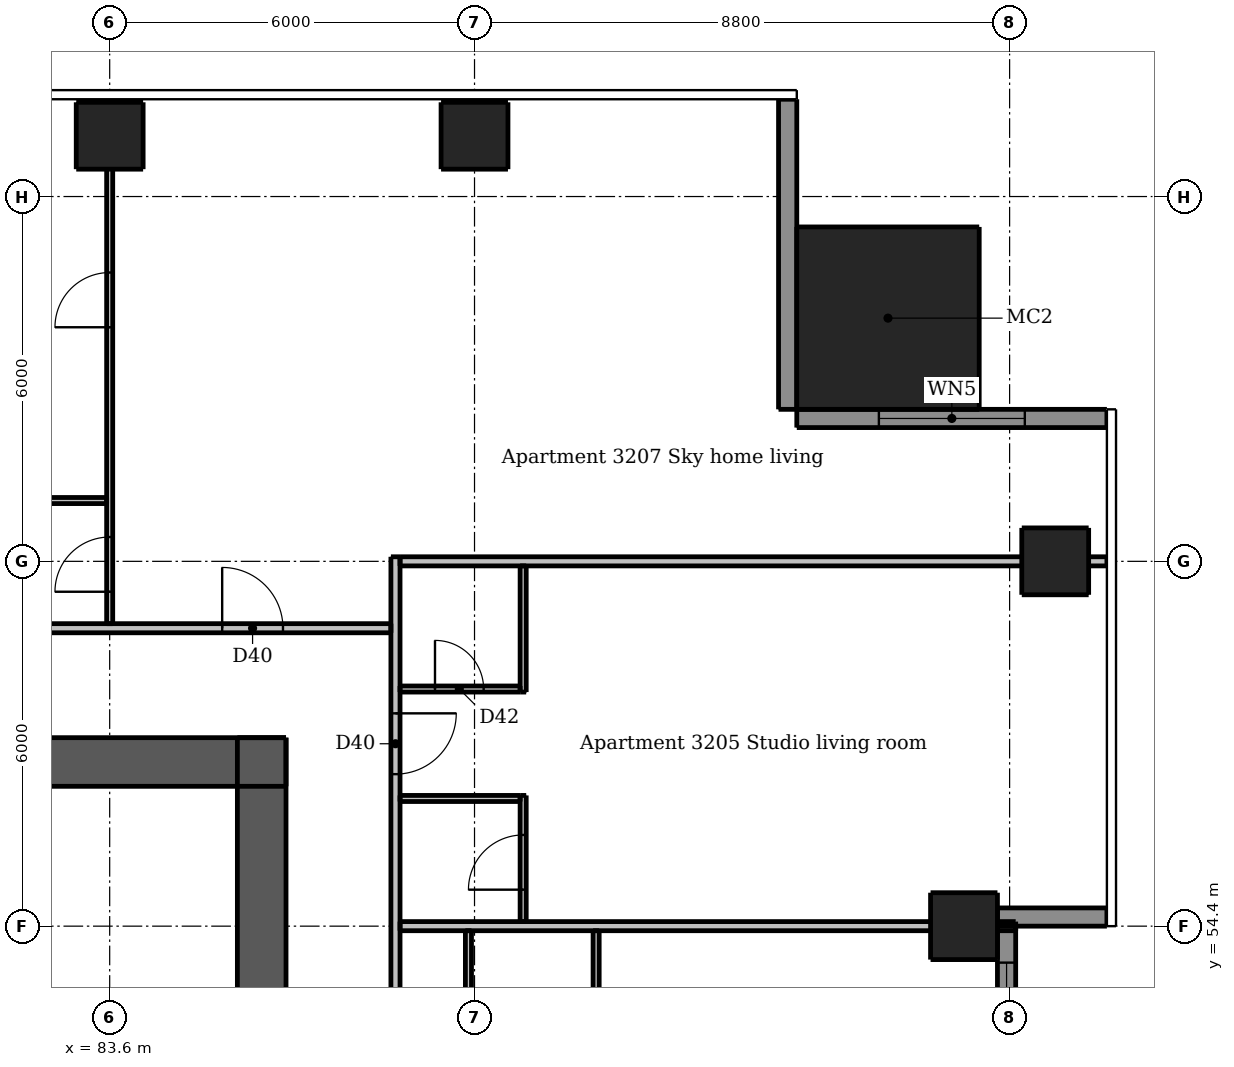
"""IFC4 building model, lengths in metres.
Left out: names, types, materials, properties, quantities, classifications, styles, units other than length and angle.
Written with IfcOpenShell. Run it as: python <this file> out.ifc"""

import sys

from ifc_helpers import new_model, si_unit, direction, frame, frame_2d, origin, origin_2d, place, context, subcontext, project, spatial, rectangle, extrude, element, fill, save


model = new_model("IFC4")
c1 = context("Model", 3, precision=1e-05, world=origin(), true_north=direction((0.0, 1.0)))
c2 = subcontext(c1, "Body", "Model", "MODEL_VIEW")
j1 = project(units=[si_unit("LENGTHUNIT", "METRE"), si_unit("PLANEANGLEUNIT", "RADIAN")], contexts=[c1])
p1 = place(None, origin())
s1 = spatial("IfcSite", under=j1, at=p1, CompositionType="ELEMENT")
p2 = place(p1, origin())
s2 = spatial("IfcBuilding", under=s1, at=p2, CompositionType="ELEMENT")
p3 = place(p2, frame((0.0, 0.0, 118.3)))
s3 = spatial("IfcBuildingStorey", under=s2, at=p3, CompositionType="ELEMENT", Elevation=118.3)
p4 = place(p3, frame((62.5, 57.1, 0.0), z_axis=(0.0, 0.0, 1.0), x_axis=(1.0, 0.0, 0.0)))
e1 = element("IfcWall", 1, at=p4, inside=s3, PredefinedType="SHEAR", context=c2, shape_type="SweptSolid", body=[
    extrude(rectangle(XDim=24.0, YDim=0.8, at=frame_2d((12.0, 0.0))), origin(), (0.0, 0.0, 1.0), 3.05),
])
p5 = place(p4, frame((20.9, 0.0, 0.0)))
e2 = element("IfcOpeningElement", 2, at=p5, cuts=e1, PredefinedType="OPENING", context=c2, shape_type="SweptSolid", body=[
    extrude(rectangle(XDim=1.1, YDim=2.1, at=frame_2d((0.55, 1.05))), frame((0.0, 0.41, 0.0), z_axis=(0.0, -1.0, 0.0), x_axis=(1.0, 0.0, 0.0)), (0.0, 0.0, 1.0), 0.82),
])
p6 = place(p4, frame((2.0, 0.0, 0.0)))
e3 = element("IfcOpeningElement", 3, at=p6, cuts=e1, PredefinedType="OPENING", context=c2, shape_type="SweptSolid", body=[
    extrude(rectangle(XDim=1.1, YDim=2.1, at=frame_2d((0.55, 1.05))), frame((0.0, 0.41, 0.0), z_axis=(0.0, -1.0, 0.0), x_axis=(1.0, 0.0, 0.0)), (0.0, 0.0, 1.0), 0.82),
])
p7 = place(p4, frame((6.075, 0.0, 0.0)))
e4 = element("IfcOpeningElement", 4, at=p7, cuts=e1, PredefinedType="OPENING", context=c2, shape_type="SweptSolid", body=[
    extrude(rectangle(XDim=0.9, YDim=2.1, at=frame_2d((0.45, 1.05))), frame((0.0, 0.41, 0.0), z_axis=(0.0, -1.0, 0.0), x_axis=(1.0, 0.0, 0.0)), (0.0, 0.0, 1.0), 0.82),
])
p8 = place(p4, frame((10.455, 0.0, 0.0)))
e5 = element("IfcOpeningElement", 5, at=p8, cuts=e1, PredefinedType="OPENING", context=c2, shape_type="SweptSolid", body=[
    extrude(rectangle(XDim=0.9, YDim=2.1, at=frame_2d((0.45, 1.05))), frame((0.0, 0.41, 0.0), z_axis=(0.0, -1.0, 0.0), x_axis=(1.0, 0.0, 0.0)), (0.0, 0.0, 1.0), 0.82),
])
p9 = place(p4, frame((15.93, 0.0, 0.0)))
e6 = element("IfcOpeningElement", 6, at=p9, cuts=e1, PredefinedType="OPENING", context=c2, shape_type="SweptSolid", body=[
    extrude(rectangle(XDim=0.9, YDim=2.1, at=frame_2d((0.45, 1.05))), frame((0.0, 0.41, 0.0), z_axis=(0.0, -1.0, 0.0), x_axis=(1.0, 0.0, 0.0)), (0.0, 0.0, 1.0), 0.82),
])
p10 = place(p3, frame((86.1, 33.5, 0.0), z_axis=(0.0, 0.0, 1.0), x_axis=(0.0, 1.0, 0.0)))
e7 = element("IfcWall", 7, at=p10, inside=s3, PredefinedType="SHEAR", context=c2, shape_type="SweptSolid", body=[
    extrude(rectangle(XDim=24.0, YDim=0.8, at=frame_2d((12.0, 0.0))), origin(), (0.0, 0.0, 1.0), 3.05),
])
p11 = place(p10, frame((11.2, 0.0, 0.0)))
e8 = element("IfcOpeningElement", 8, at=p11, cuts=e7, PredefinedType="OPENING", context=c2, shape_type="SweptSolid", body=[
    extrude(rectangle(XDim=1.6, YDim=2.1, at=frame_2d((0.8, 1.05))), frame((0.0, 0.41, 0.0), z_axis=(0.0, -1.0, 0.0), x_axis=(1.0, 0.0, 0.0)), (0.0, 0.0, 1.0), 0.82),
])
for number, where, z_axis, x_axis in (
    (9, (97.65, 54.4, 0.0), (0.0, 0.0, 1.0), (1.0, 0.0, 0.0)),
    (10, (99.15, 60.4, 0.0), (0.0, 0.0, 1.0), (1.0, 0.0, 0.0)),
    (11, (83.6, 67.4, 0.0), (0.0, 0.0, 1.0), (1.0, 0.0, 0.0)),
    (12, (89.6, 67.4, 0.0), (0.0, 0.0, 1.0), (1.0, 0.0, 0.0)),
):
    element("IfcColumn", number, at=place(p3, frame(where, z_axis=z_axis, x_axis=x_axis)), inside=s3, PredefinedType="COLUMN", context=c2, shape_type="SweptSolid", body=[
        extrude(rectangle(XDim=1.1, YDim=1.1, at=origin_2d()), origin(), (0.0, 0.0, 1.0), 3.05),
    ])
p12 = place(p3, frame((96.4, 64.4, 0.0), z_axis=(0.0, 0.0, 1.0), x_axis=(1.0, 0.0, 0.0)))
e13 = element("IfcColumn", 13, at=p12, inside=s3, PredefinedType="COLUMN", context=c2, shape_type="SweptSolid", body=[
    extrude(rectangle(XDim=3.0, YDim=3.0, at=origin_2d()), origin(), (0.0, 0.0, 1.0), 3.3),
])
p13 = place(p3, frame((98.2, 54.55, 0.0), z_axis=(0.0, 0.0, 1.0), x_axis=(1.0, 0.0, 0.0)))
e14 = element("IfcWall", 14, at=p13, inside=s3, PredefinedType="SOLIDWALL", context=c2, shape_type="SweptSolid", body=[
    extrude(rectangle(XDim=1.8, YDim=0.3, at=frame_2d((0.9, 0.0))), origin(), (0.0, 0.0, 1.0), 3.05),
])
p14 = place(p3, frame((100.0, 62.75, 0.0), z_axis=(0.0, 0.0, 1.0), x_axis=(-1.0, 0.0, 0.0)))
e15 = element("IfcWall", 15, at=p14, inside=s3, PredefinedType="SOLIDWALL", context=c2, shape_type="SweptSolid", body=[
    extrude(rectangle(XDim=5.1, YDim=0.3, at=frame_2d((2.55, 0.0))), origin(), (0.0, 0.0, 1.0), 3.05),
])
p15 = place(p14, frame((1.35, 0.0, 0.15)))
e16 = element("IfcOpeningElement", 16, at=p15, cuts=e15, PredefinedType="OPENING", context=c2, shape_type="SweptSolid", body=[
    extrude(rectangle(XDim=2.4, YDim=2.1, at=frame_2d((1.2, 1.05))), frame((0.0, 0.16, 0.0), z_axis=(0.0, -1.0, 0.0), x_axis=(1.0, 0.0, 0.0)), (0.0, 0.0, 1.0), 0.32),
])
p16 = place(p3, frame((94.75, 62.9, 0.0), z_axis=(0.0, 0.0, 1.0), x_axis=(0.0, 1.0, 0.0)))
e17 = element("IfcWall", 17, at=p16, inside=s3, PredefinedType="SOLIDWALL", context=c2, shape_type="SweptSolid", body=[
    extrude(rectangle(XDim=5.1, YDim=0.3, at=frame_2d((2.55, 0.0))), origin(), (0.0, 0.0, 1.0), 3.05),
])
p17 = place(p3, frame((98.35, 48.4, 0.0), z_axis=(0.0, 0.0, 1.0), x_axis=(0.0, 1.0, 0.0)))
e18 = element("IfcWall", 18, at=p17, inside=s3, PredefinedType="SOLIDWALL", context=c2, shape_type="SweptSolid", body=[
    extrude(rectangle(XDim=6.0, YDim=0.3, at=frame_2d((3.0, 0.0))), origin(), (0.0, 0.0, 1.0), 3.05),
])
p18 = place(p17, frame((0.6, 0.0, 0.15)))
e19 = element("IfcOpeningElement", 19, at=p18, cuts=e18, PredefinedType="OPENING", context=c2, shape_type="SweptSolid", body=[
    extrude(rectangle(XDim=1.8, YDim=2.1, at=frame_2d((0.9, 1.05))), frame((0.0, 0.16, 0.0), z_axis=(0.0, -1.0, 0.0), x_axis=(1.0, 0.0, 0.0)), (0.0, 0.0, 1.0), 0.32),
])
p19 = place(p17, frame((3.6, 0.0, 0.15)))
e20 = element("IfcOpeningElement", 20, at=p19, cuts=e18, PredefinedType="OPENING", context=c2, shape_type="SweptSolid", body=[
    extrude(rectangle(XDim=1.8, YDim=2.1, at=frame_2d((0.9, 1.05))), frame((0.0, 0.16, 0.0), z_axis=(0.0, -1.0, 0.0), x_axis=(1.0, 0.0, 0.0)), (0.0, 0.0, 1.0), 0.32),
])
p20 = place(p3, frame((83.6, 59.375, 0.0), z_axis=(0.0, 0.0, 1.0), x_axis=(0.0, 1.0, 0.0)))
e21 = element("IfcWall", 21, at=p20, inside=s3, PredefinedType="PARTITIONING", context=c2, shape_type="SweptSolid", body=[
    extrude(rectangle(XDim=8.625, YDim=0.1, at=frame_2d((4.312, 0.0))), origin(), (0.0, 0.0, 1.0), 2.516),
])
p21 = place(p20, frame((0.525, 0.0, 0.0)))
e22 = element("IfcOpeningElement", 22, at=p21, cuts=e21, PredefinedType="OPENING", context=c2, shape_type="SweptSolid", body=[
    extrude(rectangle(XDim=0.9, YDim=2.1, at=frame_2d((0.45, 1.05))), frame((0.0, 0.06, 0.0), z_axis=(0.0, -1.0, 0.0), x_axis=(1.0, 0.0, 0.0)), (0.0, 0.0, 1.0), 0.12),
])
p22 = place(p20, frame((4.875, 0.0, 0.0)))
e23 = element("IfcOpeningElement", 23, at=p22, cuts=e21, PredefinedType="OPENING", context=c2, shape_type="SweptSolid", body=[
    extrude(rectangle(XDim=0.9, YDim=2.1, at=frame_2d((0.45, 1.05))), frame((0.0, 0.06, 0.0), z_axis=(0.0, -1.0, 0.0), x_axis=(1.0, 0.0, 0.0)), (0.0, 0.0, 1.0), 0.12),
])
p23 = place(p3, frame((89.5, 54.325, 0.0), z_axis=(0.0, 0.0, 1.0), x_axis=(0.0, -1.0, 0.0)))
e24 = element("IfcWall", 24, at=p23, inside=s3, PredefinedType="PARTITIONING", context=c2, shape_type="SweptSolid", body=[
    extrude(rectangle(XDim=14.85, YDim=0.1, at=frame_2d((7.425, 0.0))), origin(), (0.0, 0.0, 1.0), 3.05),
])
p24 = place(p23, frame((5.775, 0.0, 0.0)))
e25 = element("IfcOpeningElement", 25, at=p24, cuts=e24, PredefinedType="OPENING", context=c2, shape_type="SweptSolid", body=[
    extrude(rectangle(XDim=0.9, YDim=2.1, at=frame_2d((0.45, 1.05))), frame((0.0, 0.06, 0.0), z_axis=(0.0, -1.0, 0.0), x_axis=(1.0, 0.0, 0.0)), (0.0, 0.0, 1.0), 0.12),
])
p25 = place(p23, frame((0.975, 0.0, 0.0)))
e26 = element("IfcOpeningElement", 26, at=p25, cuts=e24, PredefinedType="OPENING", context=c2, shape_type="SweptSolid", body=[
    extrude(rectangle(XDim=0.9, YDim=2.1, at=frame_2d((0.45, 1.05))), frame((0.0, 0.06, 0.0), z_axis=(0.0, -1.0, 0.0), x_axis=(1.0, 0.0, 0.0)), (0.0, 0.0, 1.0), 0.12),
])
p26 = place(p23, frame((12.975, 0.0, 0.0)))
e27 = element("IfcOpeningElement", 27, at=p26, cuts=e24, PredefinedType="OPENING", context=c2, shape_type="SweptSolid", body=[
    extrude(rectangle(XDim=0.9, YDim=2.1, at=frame_2d((0.45, 1.05))), frame((0.0, 0.06, 0.0), z_axis=(0.0, -1.0, 0.0), x_axis=(1.0, 0.0, 0.0)), (0.0, 0.0, 1.0), 0.12),
])
p27 = place(p23, frame((10.325, 0.0, 0.0)))
e28 = element("IfcOpeningElement", 28, at=p27, cuts=e24, PredefinedType="OPENING", context=c2, shape_type="SweptSolid", body=[
    extrude(rectangle(XDim=0.8, YDim=2.1, at=frame_2d((0.4, 1.05))), frame((0.0, 0.06, 0.0), z_axis=(0.0, -1.0, 0.0), x_axis=(1.0, 0.0, 0.0)), (0.0, 0.0, 1.0), 0.12),
])
p28 = place(p3, frame((90.4, 54.475, 0.0), z_axis=(0.0, 0.0, 1.0), x_axis=(0.0, 1.0, 0.0)))
e29 = element("IfcWall", 29, at=p28, inside=s3, PredefinedType="PARTITIONING", context=c2, shape_type="SweptSolid", body=[
    extrude(rectangle(XDim=2.075, YDim=0.1, at=frame_2d((1.038, 0.0))), origin(), (0.0, 0.0, 1.0), 3.05),
])
p29 = place(p28, frame((0.525, 0.0, 0.0)))
e30 = element("IfcOpeningElement", 30, at=p29, cuts=e29, PredefinedType="OPENING", context=c2, shape_type="SweptSolid", body=[
    extrude(rectangle(XDim=0.9, YDim=2.1, at=frame_2d((0.45, 1.05))), frame((0.0, 0.06, 0.0), z_axis=(0.0, -1.0, 0.0), x_axis=(1.0, 0.0, 0.0)), (0.0, 0.0, 1.0), 0.12),
])
p30 = place(p3, frame((90.4, 58.25, 0.0), z_axis=(0.0, 0.0, 1.0), x_axis=(0.0, 1.0, 0.0)))
e31 = element("IfcWall", 31, at=p30, inside=s3, PredefinedType="PARTITIONING", context=c2, shape_type="SweptSolid", body=[
    extrude(rectangle(XDim=2.075, YDim=0.1, at=frame_2d((1.038, 0.0))), origin(), (0.0, 0.0, 1.0), 3.05),
])
p31 = place(p3, frame((91.6, 51.35, 0.0), z_axis=(0.0, 0.0, 1.0), x_axis=(0.0, 1.0, 0.0)))
e32 = element("IfcWall", 32, at=p31, inside=s3, PredefinedType="PARTITIONING", context=c2, shape_type="SweptSolid", body=[
    extrude(rectangle(XDim=2.975, YDim=0.1, at=frame_2d((1.487, 0.0))), origin(), (0.0, 0.0, 1.0), 3.05),
])
p32 = place(p3, frame((83.55, 61.4, 0.0), z_axis=(0.0, 0.0, 1.0), x_axis=(-1.0, 0.0, 0.0)))
e33 = element("IfcWall", 33, at=p32, inside=s3, PredefinedType="PARTITIONING", context=c2, shape_type="SweptSolid", body=[
    extrude(rectangle(XDim=5.875, YDim=0.1, at=frame_2d((2.938, 0.0))), origin(), (0.0, 0.0, 1.0), 3.05),
])
p33 = place(p32, frame((3.75, 0.0, 0.0)))
e34 = element("IfcOpeningElement", 34, at=p33, cuts=e33, PredefinedType="OPENING", context=c2, shape_type="SweptSolid", body=[
    extrude(rectangle(XDim=0.8, YDim=2.1, at=frame_2d((0.4, 1.05))), frame((0.0, 0.06, 0.0), z_axis=(0.0, -1.0, 0.0), x_axis=(1.0, 0.0, 0.0)), (0.0, 0.0, 1.0), 0.12),
])
p34 = place(p3, frame((88.375, 58.3, 0.0), z_axis=(0.0, 0.0, 1.0), x_axis=(1.0, 0.0, 0.0)))
e35 = element("IfcWall", 35, at=p34, inside=s3, PredefinedType="PARTITIONING", context=c2, shape_type="SweptSolid", body=[
    extrude(rectangle(XDim=1.975, YDim=0.1, at=frame_2d((0.988, 0.0))), origin(), (0.0, 0.0, 1.0), 3.05),
])
p35 = place(p34, frame((0.575, 0.0, 0.0)))
e36 = element("IfcOpeningElement", 36, at=p35, cuts=e35, PredefinedType="OPENING", context=c2, shape_type="SweptSolid", body=[
    extrude(rectangle(XDim=0.8, YDim=2.1, at=frame_2d((0.4, 1.05))), frame((0.0, 0.06, 0.0), z_axis=(0.0, -1.0, 0.0), x_axis=(1.0, 0.0, 0.0)), (0.0, 0.0, 1.0), 0.12),
])
p36 = place(p3, frame((88.375, 56.5, 0.0), z_axis=(0.0, 0.0, 1.0), x_axis=(1.0, 0.0, 0.0)))
e37 = element("IfcWall", 37, at=p36, inside=s3, PredefinedType="PARTITIONING", context=c2, shape_type="SweptSolid", body=[
    extrude(rectangle(XDim=1.975, YDim=0.1, at=frame_2d((0.988, 0.0))), origin(), (0.0, 0.0, 1.0), 3.05),
])
p37 = place(p3, frame((88.3, 60.475, 0.0), z_axis=(0.0, 0.0, 1.0), x_axis=(0.0, -1.0, 0.0)))
e38 = element("IfcWall", 38, at=p37, inside=s3, PredefinedType="PARTITIONING", context=c2, shape_type="SweptSolid", body=[
    extrude(rectangle(XDim=28.7, YDim=0.15, at=frame_2d((14.35, 0.0))), origin(), (0.0, 0.0, 1.0), 3.05),
])
p38 = place(p37, frame((27.425, 0.0, 0.0)))
e39 = element("IfcOpeningElement", 39, at=p38, cuts=e38, PredefinedType="OPENING", context=c2, shape_type="SweptSolid", body=[
    extrude(rectangle(XDim=1.0, YDim=2.1, at=frame_2d((0.5, 1.05))), frame((0.0, 0.085, 0.0), z_axis=(0.0, -1.0, 0.0), x_axis=(1.0, 0.0, 0.0)), (0.0, 0.0, 1.0), 0.17),
])
p39 = place(p37, frame((13.075, 0.0, 0.0)))
e40 = element("IfcOpeningElement", 40, at=p39, cuts=e38, PredefinedType="OPENING", context=c2, shape_type="SweptSolid", body=[
    extrude(rectangle(XDim=1.0, YDim=2.1, at=frame_2d((0.5, 1.05))), frame((0.0, 0.085, 0.0), z_axis=(0.0, -1.0, 0.0), x_axis=(1.0, 0.0, 0.0)), (0.0, 0.0, 1.0), 0.17),
])
p40 = place(p37, frame((2.575, 0.0, 0.0)))
e41 = element("IfcOpeningElement", 41, at=p40, cuts=e38, PredefinedType="OPENING", context=c2, shape_type="SweptSolid", body=[
    extrude(rectangle(XDim=1.0, YDim=2.1, at=frame_2d((0.5, 1.05))), frame((0.0, 0.085, 0.0), z_axis=(0.0, -1.0, 0.0), x_axis=(1.0, 0.0, 0.0)), (0.0, 0.0, 1.0), 0.17),
])
p41 = place(p3, frame((88.375, 60.4, 0.0), z_axis=(0.0, 0.0, 1.0), x_axis=(1.0, 0.0, 0.0)))
e42 = element("IfcWall", 42, at=p41, inside=s3, PredefinedType="PARTITIONING", context=c2, shape_type="SweptSolid", body=[
    extrude(rectangle(XDim=11.625, YDim=0.15, at=frame_2d((5.812, 0.0))), origin(), (0.0, 0.0, 1.0), 2.516),
])
p42 = place(p3, frame((59.675, 59.3, 0.0), z_axis=(0.0, 0.0, 1.0), x_axis=(1.0, 0.0, 0.0)))
e43 = element("IfcWall", 43, at=p42, inside=s3, PredefinedType="PARTITIONING", context=c2, shape_type="SweptSolid", body=[
    extrude(rectangle(XDim=28.55, YDim=0.15, at=frame_2d((14.275, 0.0))), origin(), (0.0, 0.0, 1.0), 3.05),
])
p43 = place(p42, frame((8.975, 0.0, 0.0)))
e44 = element("IfcOpeningElement", 44, at=p43, cuts=e43, PredefinedType="OPENING", context=c2, shape_type="SweptSolid", body=[
    extrude(rectangle(XDim=1.0, YDim=2.1, at=frame_2d((0.5, 1.05))), frame((0.0, 0.085, 0.0), z_axis=(0.0, -1.0, 0.0), x_axis=(1.0, 0.0, 0.0)), (0.0, 0.0, 1.0), 0.17),
])
p44 = place(p42, frame((25.775, 0.0, 0.0)))
e45 = element("IfcOpeningElement", 45, at=p44, cuts=e43, PredefinedType="OPENING", context=c2, shape_type="SweptSolid", body=[
    extrude(rectangle(XDim=1.0, YDim=2.1, at=frame_2d((0.5, 1.05))), frame((0.0, 0.085, 0.0), z_axis=(0.0, -1.0, 0.0), x_axis=(1.0, 0.0, 0.0)), (0.0, 0.0, 1.0), 0.17),
])
p45 = place(p3, frame((88.375, 54.4, 0.0), z_axis=(0.0, 0.0, 1.0), x_axis=(1.0, 0.0, 0.0)))
e46 = element("IfcWall", 46, at=p45, inside=s3, PredefinedType="PARTITIONING", context=c2, shape_type="SweptSolid", body=[
    extrude(rectangle(XDim=10.125, YDim=0.15, at=frame_2d((5.062, 0.0))), origin(), (0.0, 0.0, 1.0), 2.516),
])
p46 = place(p15, origin())
e47 = element("IfcWindow", 47, at=p46, inside=s3, PartitioningType="DOUBLE_PANEL_VERTICAL", PredefinedType="WINDOW", context=c2, shape_type="SweptSolid", body=[
    extrude(rectangle(XDim=2.4, YDim=2.1, at=frame_2d((1.2, 1.05))), frame((0.0, 0.03, 0.0), z_axis=(0.0, -1.0, 0.0), x_axis=(1.0, 0.0, 0.0)), (0.0, 0.0, 1.0), 0.06),
])
fill(e16, e47)
p47 = place(p19, origin())
e48 = element("IfcWindow", 48, at=p47, inside=s3, PartitioningType="DOUBLE_PANEL_VERTICAL", PredefinedType="WINDOW", context=c2, shape_type="SweptSolid", body=[
    extrude(rectangle(XDim=1.8, YDim=2.1, at=frame_2d((0.9, 1.05))), frame((0.0, 0.03, 0.0), z_axis=(0.0, -1.0, 0.0), x_axis=(1.0, 0.0, 0.0)), (0.0, 0.0, 1.0), 0.06),
])
fill(e20, e48)
p48 = place(p5, origin())
e49 = element("IfcDoor", 49, at=p48, inside=s3, OperationType="SINGLE_SWING_RIGHT", PredefinedType="DOOR", context=c2, shape_type="SweptSolid", body=[
    extrude(rectangle(XDim=1.1, YDim=2.1, at=frame_2d((0.55, 1.05))), frame((0.0, -0.337, 0.0), z_axis=(0.0, -1.0, 0.0), x_axis=(1.0, 0.0, 0.0)), (0.0, 0.0, 1.0), 0.05),
])
fill(e2, e49)
p49 = place(p40, origin())
e50 = element("IfcDoor", 50, at=p49, inside=s3, OperationType="SINGLE_SWING_LEFT", PredefinedType="DOOR", context=c2, shape_type="SweptSolid", body=[
    extrude(rectangle(XDim=1.0, YDim=2.1, at=frame_2d((0.5, 1.05))), frame((0.0, 0.025, 0.0), z_axis=(0.0, -1.0, 0.0), x_axis=(1.0, 0.0, 0.0)), (0.0, 0.0, 1.0), 0.05),
])
fill(e41, e50)
p50 = place(p29, origin())
e51 = element("IfcDoor", 51, at=p50, inside=s3, OperationType="SINGLE_SWING_LEFT", PredefinedType="DOOR", context=c2, shape_type="SweptSolid", body=[
    extrude(rectangle(XDim=0.9, YDim=2.1, at=frame_2d((0.45, 1.05))), frame((0.0, 0.025, 0.0), z_axis=(0.0, -1.0, 0.0), x_axis=(1.0, 0.0, 0.0)), (0.0, 0.0, 1.0), 0.05),
])
fill(e30, e51)
p51 = place(p35, origin())
e52 = element("IfcDoor", 52, at=p51, inside=s3, OperationType="SINGLE_SWING_LEFT", PredefinedType="DOOR", context=c2, shape_type="SweptSolid", body=[
    extrude(rectangle(XDim=0.8, YDim=2.1, at=frame_2d((0.4, 1.05))), frame((0.0, 0.025, 0.0), z_axis=(0.0, -1.0, 0.0), x_axis=(1.0, 0.0, 0.0)), (0.0, 0.0, 1.0), 0.05),
])
fill(e36, e52)
p52 = place(p44, origin())
e53 = element("IfcDoor", 53, at=p52, inside=s3, OperationType="SINGLE_SWING_LEFT", PredefinedType="DOOR", context=c2, shape_type="SweptSolid", body=[
    extrude(rectangle(XDim=1.0, YDim=2.1, at=frame_2d((0.5, 1.05))), frame((0.0, 0.025, 0.0), z_axis=(0.0, -1.0, 0.0), x_axis=(1.0, 0.0, 0.0)), (0.0, 0.0, 1.0), 0.05),
])
fill(e45, e53)
p53 = place(p21, origin())
e54 = element("IfcDoor", 54, at=p53, inside=s3, OperationType="SINGLE_SWING_LEFT", PredefinedType="DOOR", context=c2, shape_type="SweptSolid", body=[
    extrude(rectangle(XDim=0.9, YDim=2.1, at=frame_2d((0.45, 1.05))), frame((0.0, 0.025, 0.0), z_axis=(0.0, -1.0, 0.0), x_axis=(1.0, 0.0, 0.0)), (0.0, 0.0, 1.0), 0.05),
])
fill(e22, e54)
p54 = place(p22, origin())
e55 = element("IfcDoor", 55, at=p54, inside=s3, OperationType="SINGLE_SWING_LEFT", PredefinedType="DOOR", context=c2, shape_type="SweptSolid", body=[
    extrude(rectangle(XDim=0.9, YDim=2.1, at=frame_2d((0.45, 1.05))), frame((0.0, 0.025, 0.0), z_axis=(0.0, -1.0, 0.0), x_axis=(1.0, 0.0, 0.0)), (0.0, 0.0, 1.0), 0.05),
])
fill(e23, e55)
save(model, sys.argv[1])
